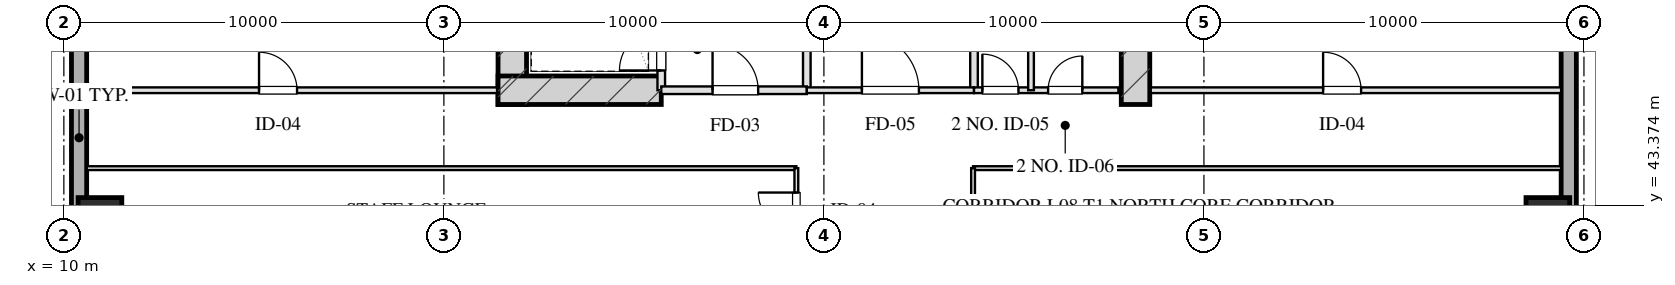
"""IFC4 building model, lengths in metres.
Left out: names, types, materials, properties, quantities, classifications, styles, units other than length and angle.
Written with IfcOpenShell. Run it as: python <this file> out.ifc"""

import sys

from ifc_helpers import new_model, si_unit, direction, frame, frame_2d, origin, origin_2d, place, context, subcontext, project, spatial, rectangle, hollow_rectangle, extrude, element, fill, save


model = new_model("IFC4")
c1 = context("Model", 3, precision=1e-05, world=origin(), true_north=direction((0.0, 1.0)))
c2 = subcontext(c1, "Body", "Model", "MODEL_VIEW")
j1 = project(units=[si_unit("LENGTHUNIT", "METRE"), si_unit("PLANEANGLEUNIT", "RADIAN")], contexts=[c1])
p1 = place(None, origin())
s1 = spatial("IfcSite", under=j1, at=p1, CompositionType="ELEMENT")
p2 = place(p1, origin())
s2 = spatial("IfcBuilding", under=s1, at=p2, CompositionType="ELEMENT")
p3 = place(p2, frame((0.0, 0.0, 38.0)))
s3 = spatial("IfcBuildingStorey", under=s2, at=p3, CompositionType="ELEMENT", Elevation=38.0)
for number, where, z_axis, x_axis in (
    (1, (21.8, 46.025, 0.0), (0.0, 0.0, 1.0), (0.0, 1.0, 0.0)),
    (2, (38.2, 46.025, 0.0), (0.0, 0.0, 1.0), (0.0, 1.0, 0.0)),
):
    element("IfcWall", number, at=place(p3, frame(where, z_axis=z_axis, x_axis=x_axis)), inside=s3, PredefinedType="SHEAR", context=c2, shape_type="SweptSolid", body=[
        extrude(rectangle(XDim=9.63, YDim=0.75, at=frame_2d((4.815, 0.0))), origin(), (0.0, 0.0, 1.0), 4.0),
    ])
p4 = place(p3, frame((21.425, 46.4, 0.0), z_axis=(0.0, 0.0, 1.0), x_axis=(1.0, 0.0, 0.0)))
e3 = element("IfcWall", 3, at=p4, inside=s3, PredefinedType="SHEAR", context=c2, shape_type="SweptSolid", body=[
    extrude(rectangle(XDim=4.295, YDim=0.75, at=frame_2d((2.147, 0.0))), origin(), (0.0, 0.0, 1.0), 4.0),
])
for number, where, z_axis, x_axis in (
    (4, (10.95, 43.0, 0.0), (0.0, 0.0, 1.0), (1.0, 0.0, 0.0)),
    (5, (49.05, 43.0, 0.0), (0.0, 0.0, 1.0), (1.0, 0.0, 0.0)),
):
    element("IfcColumn", number, at=place(p3, frame(where, z_axis=z_axis, x_axis=x_axis)), inside=s3, PredefinedType="COLUMN", context=c2, shape_type="SweptSolid", body=[
        extrude(hollow_rectangle(XDim=1.15, YDim=1.15, WallThickness=0.04, at=origin_2d()), origin(), (0.0, 0.0, 1.0), 4.001),
    ])
p5 = place(p3, frame((10.4, 7.2, 0.0), z_axis=(0.0, 0.0, 1.0), x_axis=(0.0, 1.0, 0.0)))
e6 = element("IfcWall", 6, at=p5, inside=s3, PredefinedType="SOLIDWALL", context=c2, shape_type="SweptSolid", body=[
    extrude(rectangle(XDim=53.6, YDim=0.4, at=frame_2d((26.8, 0.0))), origin(), (0.0, 0.0, 1.0), 3.16),
])
p6 = place(p5, frame((28.15, 0.0, 0.75)))
e7 = element("IfcOpeningElement", 7, at=p6, cuts=e6, PredefinedType="OPENING", context=c2, shape_type="SweptSolid", body=[
    extrude(rectangle(XDim=2.5, YDim=1.75, at=frame_2d((1.25, 0.875))), frame((0.0, 0.21, 0.0), z_axis=(0.0, -1.0, 0.0), x_axis=(1.0, 0.0, 0.0)), (0.0, 0.0, 1.0), 0.42),
])
p7 = place(p5, frame((20.45, 0.0, 0.0)))
e8 = element("IfcOpeningElement", 8, at=p7, cuts=e6, PredefinedType="OPENING", context=c2, shape_type="SweptSolid", body=[
    extrude(rectangle(XDim=1.1, YDim=2.15, at=frame_2d((0.55, 1.075))), frame((0.0, 0.21, 0.0), z_axis=(0.0, -1.0, 0.0), x_axis=(1.0, 0.0, 0.0)), (0.0, 0.0, 1.0), 0.42),
])
p8 = place(p3, frame((49.6, 60.8, 0.0), z_axis=(0.0, 0.0, 1.0), x_axis=(0.0, -1.0, 0.0)))
e9 = element("IfcWall", 9, at=p8, inside=s3, PredefinedType="SOLIDWALL", context=c2, shape_type="SweptSolid", body=[
    extrude(rectangle(XDim=53.6, YDim=0.4, at=frame_2d((26.8, 0.0))), origin(), (0.0, 0.0, 1.0), 3.16),
])
p9 = place(p8, frame((19.15, 0.0, 0.75)))
e10 = element("IfcOpeningElement", 10, at=p9, cuts=e9, PredefinedType="OPENING", context=c2, shape_type="SweptSolid", body=[
    extrude(rectangle(XDim=2.5, YDim=1.75, at=frame_2d((1.25, 0.875))), frame((0.0, 0.21, 0.0), z_axis=(0.0, -1.0, 0.0), x_axis=(1.0, 0.0, 0.0)), (0.0, 0.0, 1.0), 0.42),
])
p10 = place(p8, frame((32.05, 0.0, 0.0)))
e11 = element("IfcOpeningElement", 11, at=p10, cuts=e9, PredefinedType="OPENING", context=c2, shape_type="SweptSolid", body=[
    extrude(rectangle(XDim=1.1, YDim=2.15, at=frame_2d((0.55, 1.075))), frame((0.0, 0.21, 0.0), z_axis=(0.0, -1.0, 0.0), x_axis=(1.0, 0.0, 0.0)), (0.0, 0.0, 1.0), 0.42),
])
p11 = place(p3, frame((25.72, 46.4, 0.0), z_axis=(0.0, 0.0, 1.0), x_axis=(0.0, 1.0, 0.0)))
e12 = element("IfcWall", 12, at=p11, inside=s3, PredefinedType="PARTITIONING", context=c2, shape_type="SweptSolid", body=[
    extrude(rectangle(XDim=1.9, YDim=0.2, at=frame_2d((0.95, 0.0))), origin(), (0.0, 0.0, 1.0), 3.725),
])
p12 = place(p11, frame((0.52, 0.0, 0.0)))
e13 = element("IfcOpeningElement", 13, at=p12, cuts=e12, PredefinedType="OPENING", context=c2, shape_type="SweptSolid", body=[
    extrude(rectangle(XDim=1.1, YDim=2.05, at=frame_2d((0.55, 1.025))), frame((0.0, 0.11, 0.0), z_axis=(0.0, -1.0, 0.0), x_axis=(1.0, 0.0, 0.0)), (0.0, 0.0, 1.0), 0.22),
])
p13 = place(p3, frame((29.55, 46.4, 0.0), z_axis=(0.0, 0.0, 1.0), x_axis=(0.0, 1.0, 0.0)))
e14 = element("IfcWall", 14, at=p13, inside=s3, PredefinedType="PARTITIONING", context=c2, shape_type="SweptSolid", body=[
    extrude(rectangle(XDim=8.43, YDim=0.2, at=frame_2d((4.215, 0.0))), origin(), (0.0, 0.0, 1.0), 3.725),
])
p14 = place(p3, frame((25.72, 46.4, 0.0), z_axis=(0.0, 0.0, 1.0), x_axis=(1.0, 0.0, 0.0)))
e15 = element("IfcWall", 15, at=p14, inside=s3, PredefinedType="PARTITIONING", context=c2, shape_type="SweptSolid", body=[
    extrude(rectangle(XDim=3.83, YDim=0.2, at=frame_2d((1.915, 0.0))), origin(), (0.0, 0.0, 1.0), 3.725),
])
p15 = place(p14, frame((1.35, 0.0, 0.0)))
e16 = element("IfcOpeningElement", 16, at=p15, cuts=e15, PredefinedType="OPENING", context=c2, shape_type="SweptSolid", body=[
    extrude(rectangle(XDim=1.2, YDim=2.05, at=frame_2d((0.6, 1.025))), frame((0.0, 0.11, 0.0), z_axis=(0.0, -1.0, 0.0), x_axis=(1.0, 0.0, 0.0)), (0.0, 0.0, 1.0), 0.22),
])
p16 = place(p3, frame((33.95, 46.4, 0.0), z_axis=(0.0, 0.0, 1.0), x_axis=(0.0, 1.0, 0.0)))
e17 = element("IfcWall", 17, at=p16, inside=s3, PredefinedType="PARTITIONING", context=c2, shape_type="SweptSolid", body=[
    extrude(rectangle(XDim=8.43, YDim=0.2, at=frame_2d((4.215, 0.0))), origin(), (0.0, 0.0, 1.0), 3.725),
])
p17 = place(p3, frame((29.55, 46.4, 0.0), z_axis=(0.0, 0.0, 1.0), x_axis=(1.0, 0.0, 0.0)))
e18 = element("IfcWall", 18, at=p17, inside=s3, PredefinedType="PARTITIONING", context=c2, shape_type="SweptSolid", body=[
    extrude(rectangle(XDim=4.4, YDim=0.15, at=frame_2d((2.2, 0.0))), origin(), (0.0, 0.0, 1.0), 3.725),
])
p18 = place(p17, frame((1.45, 0.0, 0.0)))
e19 = element("IfcOpeningElement", 19, at=p18, cuts=e18, PredefinedType="OPENING", context=c2, shape_type="SweptSolid", body=[
    extrude(rectangle(XDim=1.5, YDim=2.05, at=frame_2d((0.75, 1.025))), frame((0.0, 0.085, 0.0), z_axis=(0.0, -1.0, 0.0), x_axis=(1.0, 0.0, 0.0)), (0.0, 0.0, 1.0), 0.17),
])
p19 = place(p3, frame((33.95, 46.4, 0.0), z_axis=(0.0, 0.0, 1.0), x_axis=(1.0, 0.0, 0.0)))
e20 = element("IfcWall", 20, at=p19, inside=s3, PredefinedType="PARTITIONING", context=c2, shape_type="SweptSolid", body=[
    extrude(rectangle(XDim=3.8, YDim=0.15, at=frame_2d((1.9, 0.0))), origin(), (0.0, 0.0, 1.0), 3.725),
])
p20 = place(p19, frame((0.22, 0.0, 0.0)))
e21 = element("IfcOpeningElement", 21, at=p20, cuts=e20, PredefinedType="OPENING", context=c2, shape_type="SweptSolid", body=[
    extrude(rectangle(XDim=0.95, YDim=2.05, at=frame_2d((0.475, 1.025))), frame((0.0, 0.085, 0.0), z_axis=(0.0, -1.0, 0.0), x_axis=(1.0, 0.0, 0.0)), (0.0, 0.0, 1.0), 0.17),
])
p21 = place(p19, frame((1.95, 0.0, 0.0)))
e22 = element("IfcOpeningElement", 22, at=p21, cuts=e20, PredefinedType="OPENING", context=c2, shape_type="SweptSolid", body=[
    extrude(rectangle(XDim=0.9, YDim=2.05, at=frame_2d((0.45, 1.025))), frame((0.0, 0.085, 0.0), z_axis=(0.0, -1.0, 0.0), x_axis=(1.0, 0.0, 0.0)), (0.0, 0.0, 1.0), 0.17),
])
p22 = place(p3, frame((35.45, 46.4, 0.0), z_axis=(0.0, 0.0, 1.0), x_axis=(0.0, 1.0, 0.0)))
e23 = element("IfcWall", 23, at=p22, inside=s3, PredefinedType="PARTITIONING", context=c2, shape_type="SweptSolid", body=[
    extrude(rectangle(XDim=8.43, YDim=0.15, at=frame_2d((4.215, 0.0))), origin(), (0.0, 0.0, 1.0), 3.315),
])
p23 = place(p22, frame((2.55, 0.0, 0.0)))
e24 = element("IfcOpeningElement", 24, at=p23, cuts=e23, PredefinedType="OPENING", context=c2, shape_type="SweptSolid", body=[
    extrude(rectangle(XDim=0.95, YDim=2.05, at=frame_2d((0.475, 1.025))), frame((0.0, 0.085, 0.0), z_axis=(0.0, -1.0, 0.0), x_axis=(1.0, 0.0, 0.0)), (0.0, 0.0, 1.0), 0.17),
])
p24 = place(p22, frame((5.6, 0.0, 0.0)))
e25 = element("IfcOpeningElement", 25, at=p24, cuts=e23, PredefinedType="OPENING", context=c2, shape_type="SweptSolid", body=[
    extrude(rectangle(XDim=0.9, YDim=2.05, at=frame_2d((0.45, 1.025))), frame((0.0, 0.085, 0.0), z_axis=(0.0, -1.0, 0.0), x_axis=(1.0, 0.0, 0.0)), (0.0, 0.0, 1.0), 0.17),
])
p25 = place(p3, frame((10.6, 46.4, 0.0), z_axis=(0.0, 0.0, 1.0), x_axis=(1.0, 0.0, 0.0)))
e26 = element("IfcWall", 26, at=p25, inside=s3, PredefinedType="PARTITIONING", context=c2, shape_type="SweptSolid", body=[
    extrude(rectangle(XDim=10.8, YDim=0.15, at=frame_2d((5.4, 0.0))), origin(), (0.0, 0.0, 1.0), 3.725),
])
p26 = place(p25, frame((4.536, 0.0, 0.0)))
e27 = element("IfcOpeningElement", 27, at=p26, cuts=e26, PredefinedType="OPENING", context=c2, shape_type="SweptSolid", body=[
    extrude(rectangle(XDim=1.0, YDim=2.05, at=frame_2d((0.5, 1.025))), frame((0.0, 0.085, 0.0), z_axis=(0.0, -1.0, 0.0), x_axis=(1.0, 0.0, 0.0)), (0.0, 0.0, 1.0), 0.17),
])
p27 = place(p3, frame((38.6, 46.4, 0.0), z_axis=(0.0, 0.0, 1.0), x_axis=(1.0, 0.0, 0.0)))
e28 = element("IfcWall", 28, at=p27, inside=s3, PredefinedType="PARTITIONING", context=c2, shape_type="SweptSolid", body=[
    extrude(rectangle(XDim=10.8, YDim=0.15, at=frame_2d((5.4, 0.0))), origin(), (0.0, 0.0, 1.0), 3.725),
])
p28 = place(p27, frame((4.536, 0.0, 0.0)))
e29 = element("IfcOpeningElement", 29, at=p28, cuts=e28, PredefinedType="OPENING", context=c2, shape_type="SweptSolid", body=[
    extrude(rectangle(XDim=1.0, YDim=2.05, at=frame_2d((0.5, 1.025))), frame((0.0, 0.085, 0.0), z_axis=(0.0, -1.0, 0.0), x_axis=(1.0, 0.0, 0.0)), (0.0, 0.0, 1.0), 0.17),
])
p29 = place(p3, frame((10.6, 44.35, 0.0), z_axis=(0.0, 0.0, 1.0), x_axis=(1.0, 0.0, 0.0)))
e30 = element("IfcWall", 30, at=p29, inside=s3, PredefinedType="MOVABLE", context=c2, shape_type="SweptSolid", body=[
    extrude(rectangle(XDim=18.675, YDim=0.1, at=frame_2d((9.337, 0.0))), origin(), (0.0, 0.0, 1.0), 3.725),
])
p30 = place(p3, frame((33.925, 44.35, 0.0), z_axis=(0.0, 0.0, 1.0), x_axis=(1.0, 0.0, 0.0)))
e31 = element("IfcWall", 31, at=p30, inside=s3, PredefinedType="MOVABLE", context=c2, shape_type="SweptSolid", body=[
    extrude(rectangle(XDim=15.475, YDim=0.1, at=frame_2d((7.737, 0.0))), origin(), (0.0, 0.0, 1.0), 3.725),
])
p31 = place(p3, frame((29.275, 23.65, 0.0), z_axis=(0.0, 0.0, 1.0), x_axis=(0.0, 1.0, 0.0)))
e32 = element("IfcWall", 32, at=p31, inside=s3, PredefinedType="MOVABLE", context=c2, shape_type="SweptSolid", body=[
    extrude(rectangle(XDim=20.7, YDim=0.1, at=frame_2d((10.35, 0.0))), origin(), (0.0, 0.0, 1.0), 3.725),
])
p32 = place(p31, frame((0.775, 0.0, 0.0)))
e33 = element("IfcOpeningElement", 33, at=p32, cuts=e32, PredefinedType="OPENING", context=c2, shape_type="SweptSolid", body=[
    extrude(rectangle(XDim=0.85, YDim=2.05, at=frame_2d((0.425, 1.025))), frame((0.0, 0.06, 0.0), z_axis=(0.0, -1.0, 0.0), x_axis=(1.0, 0.0, 0.0)), (0.0, 0.0, 1.0), 0.12),
])
p33 = place(p31, frame((3.95, 0.0, 0.0)))
e34 = element("IfcOpeningElement", 34, at=p33, cuts=e32, PredefinedType="OPENING", context=c2, shape_type="SweptSolid", body=[
    extrude(rectangle(XDim=1.0, YDim=2.05, at=frame_2d((0.5, 1.025))), frame((0.0, 0.06, 0.0), z_axis=(0.0, -1.0, 0.0), x_axis=(1.0, 0.0, 0.0)), (0.0, 0.0, 1.0), 0.12),
])
p34 = place(p31, frame((8.364, 0.0, 0.0)))
e35 = element("IfcOpeningElement", 35, at=p34, cuts=e32, PredefinedType="OPENING", context=c2, shape_type="SweptSolid", body=[
    extrude(rectangle(XDim=1.05, YDim=2.05, at=frame_2d((0.525, 1.025))), frame((0.0, 0.06, 0.0), z_axis=(0.0, -1.0, 0.0), x_axis=(1.0, 0.0, 0.0)), (0.0, 0.0, 1.0), 0.12),
])
p35 = place(p31, frame((12.864, 0.0, 0.0)))
e36 = element("IfcOpeningElement", 36, at=p35, cuts=e32, PredefinedType="OPENING", context=c2, shape_type="SweptSolid", body=[
    extrude(rectangle(XDim=1.0, YDim=2.05, at=frame_2d((0.5, 1.025))), frame((0.0, 0.06, 0.0), z_axis=(0.0, -1.0, 0.0), x_axis=(1.0, 0.0, 0.0)), (0.0, 0.0, 1.0), 0.12),
])
p36 = place(p31, frame((16.383, 0.0, 0.0)))
e37 = element("IfcOpeningElement", 37, at=p36, cuts=e32, PredefinedType="OPENING", context=c2, shape_type="SweptSolid", body=[
    extrude(rectangle(XDim=1.0, YDim=2.05, at=frame_2d((0.5, 1.025))), frame((0.0, 0.06, 0.0), z_axis=(0.0, -1.0, 0.0), x_axis=(1.0, 0.0, 0.0)), (0.0, 0.0, 1.0), 0.12),
])
p37 = place(p31, frame((19.058, 0.0, 0.0)))
e38 = element("IfcOpeningElement", 38, at=p37, cuts=e32, PredefinedType="OPENING", context=c2, shape_type="SweptSolid", body=[
    extrude(rectangle(XDim=1.0, YDim=2.05, at=frame_2d((0.5, 1.025))), frame((0.0, 0.06, 0.0), z_axis=(0.0, -1.0, 0.0), x_axis=(1.0, 0.0, 0.0)), (0.0, 0.0, 1.0), 0.12),
])
p38 = place(p3, frame((33.925, 23.65, 0.0), z_axis=(0.0, 0.0, 1.0), x_axis=(0.0, 1.0, 0.0)))
e39 = element("IfcWall", 39, at=p38, inside=s3, PredefinedType="MOVABLE", context=c2, shape_type="SweptSolid", body=[
    extrude(rectangle(XDim=20.7, YDim=0.1, at=frame_2d((10.35, 0.0))), origin(), (0.0, 0.0, 1.0), 3.725),
])
p39 = place(p38, frame((2.675, 0.0, 0.0)))
e40 = element("IfcOpeningElement", 40, at=p39, cuts=e39, PredefinedType="OPENING", context=c2, shape_type="SweptSolid", body=[
    extrude(rectangle(XDim=1.0, YDim=2.05, at=frame_2d((0.5, 1.025))), frame((0.0, 0.06, 0.0), z_axis=(0.0, -1.0, 0.0), x_axis=(1.0, 0.0, 0.0)), (0.0, 0.0, 1.0), 0.12),
])
p40 = place(p38, frame((9.85, 0.0, 0.0)))
e41 = element("IfcOpeningElement", 41, at=p40, cuts=e39, PredefinedType="OPENING", context=c2, shape_type="SweptSolid", body=[
    extrude(rectangle(XDim=1.0, YDim=2.05, at=frame_2d((0.5, 1.025))), frame((0.0, 0.06, 0.0), z_axis=(0.0, -1.0, 0.0), x_axis=(1.0, 0.0, 0.0)), (0.0, 0.0, 1.0), 0.12),
])
p41 = place(p38, frame((17.025, 0.0, 0.0)))
e42 = element("IfcOpeningElement", 42, at=p41, cuts=e39, PredefinedType="OPENING", context=c2, shape_type="SweptSolid", body=[
    extrude(rectangle(XDim=1.0, YDim=2.05, at=frame_2d((0.5, 1.025))), frame((0.0, 0.06, 0.0), z_axis=(0.0, -1.0, 0.0), x_axis=(1.0, 0.0, 0.0)), (0.0, 0.0, 1.0), 0.12),
])
p42 = place(p12, origin())
e43 = element("IfcDoor", 43, at=p42, inside=s3, OperationType="SINGLE_SWING_LEFT", PredefinedType="DOOR", context=c2, shape_type="SweptSolid", body=[
    extrude(rectangle(XDim=1.1, YDim=2.05, at=frame_2d((0.55, 1.025))), frame((0.0, 0.025, 0.0), z_axis=(0.0, -1.0, 0.0), x_axis=(1.0, 0.0, 0.0)), (0.0, 0.0, 1.0), 0.05),
])
fill(e13, e43)
p43 = place(p15, origin())
e44 = element("IfcDoor", 44, at=p43, inside=s3, OperationType="SINGLE_SWING_LEFT", PredefinedType="DOOR", context=c2, shape_type="SweptSolid", body=[
    extrude(rectangle(XDim=1.2, YDim=2.05, at=frame_2d((0.6, 1.025))), frame((0.0, 0.025, 0.0), z_axis=(0.0, -1.0, 0.0), x_axis=(1.0, 0.0, 0.0)), (0.0, 0.0, 1.0), 0.05),
])
fill(e16, e44)
p44 = place(p18, origin())
e45 = element("IfcDoor", 45, at=p44, inside=s3, OperationType="SINGLE_SWING_LEFT", PredefinedType="DOOR", context=c2, shape_type="SweptSolid", body=[
    extrude(rectangle(XDim=1.5, YDim=2.05, at=frame_2d((0.75, 1.025))), frame((0.0, 0.025, 0.0), z_axis=(0.0, -1.0, 0.0), x_axis=(1.0, 0.0, 0.0)), (0.0, 0.0, 1.0), 0.05),
])
fill(e19, e45)
p45 = place(p20, origin())
e46 = element("IfcDoor", 46, at=p45, inside=s3, OperationType="SINGLE_SWING_LEFT", PredefinedType="DOOR", context=c2, shape_type="SweptSolid", body=[
    extrude(rectangle(XDim=0.95, YDim=2.05, at=frame_2d((0.475, 1.025))), frame((0.0, 0.025, 0.0), z_axis=(0.0, -1.0, 0.0), x_axis=(1.0, 0.0, 0.0)), (0.0, 0.0, 1.0), 0.05),
])
fill(e21, e46)
p46 = place(p21, origin())
e47 = element("IfcDoor", 47, at=p46, inside=s3, OperationType="SINGLE_SWING_RIGHT", PredefinedType="DOOR", context=c2, shape_type="SweptSolid", body=[
    extrude(rectangle(XDim=0.9, YDim=2.05, at=frame_2d((0.45, 1.025))), frame((0.0, 0.025, 0.0), z_axis=(0.0, -1.0, 0.0), x_axis=(1.0, 0.0, 0.0)), (0.0, 0.0, 1.0), 0.05),
])
fill(e22, e47)
p47 = place(p26, origin())
e48 = element("IfcDoor", 48, at=p47, inside=s3, OperationType="SINGLE_SWING_LEFT", PredefinedType="DOOR", context=c2, shape_type="SweptSolid", body=[
    extrude(rectangle(XDim=1.0, YDim=2.05, at=frame_2d((0.5, 1.025))), frame((0.0, 0.025, 0.0), z_axis=(0.0, -1.0, 0.0), x_axis=(1.0, 0.0, 0.0)), (0.0, 0.0, 1.0), 0.05),
])
fill(e27, e48)
p48 = place(p28, origin())
e49 = element("IfcDoor", 49, at=p48, inside=s3, OperationType="SINGLE_SWING_LEFT", PredefinedType="DOOR", context=c2, shape_type="SweptSolid", body=[
    extrude(rectangle(XDim=1.0, YDim=2.05, at=frame_2d((0.5, 1.025))), frame((0.0, 0.025, 0.0), z_axis=(0.0, -1.0, 0.0), x_axis=(1.0, 0.0, 0.0)), (0.0, 0.0, 1.0), 0.05),
])
fill(e29, e49)
p49 = place(p37, origin())
e50 = element("IfcDoor", 50, at=p49, inside=s3, OperationType="SINGLE_SWING_RIGHT", PredefinedType="DOOR", context=c2, shape_type="SweptSolid", body=[
    extrude(rectangle(XDim=1.0, YDim=2.05, at=frame_2d((0.5, 1.025))), frame((0.0, 0.025, 0.0), z_axis=(0.0, -1.0, 0.0), x_axis=(1.0, 0.0, 0.0)), (0.0, 0.0, 1.0), 0.05),
])
fill(e38, e50)
save(model, sys.argv[1])
